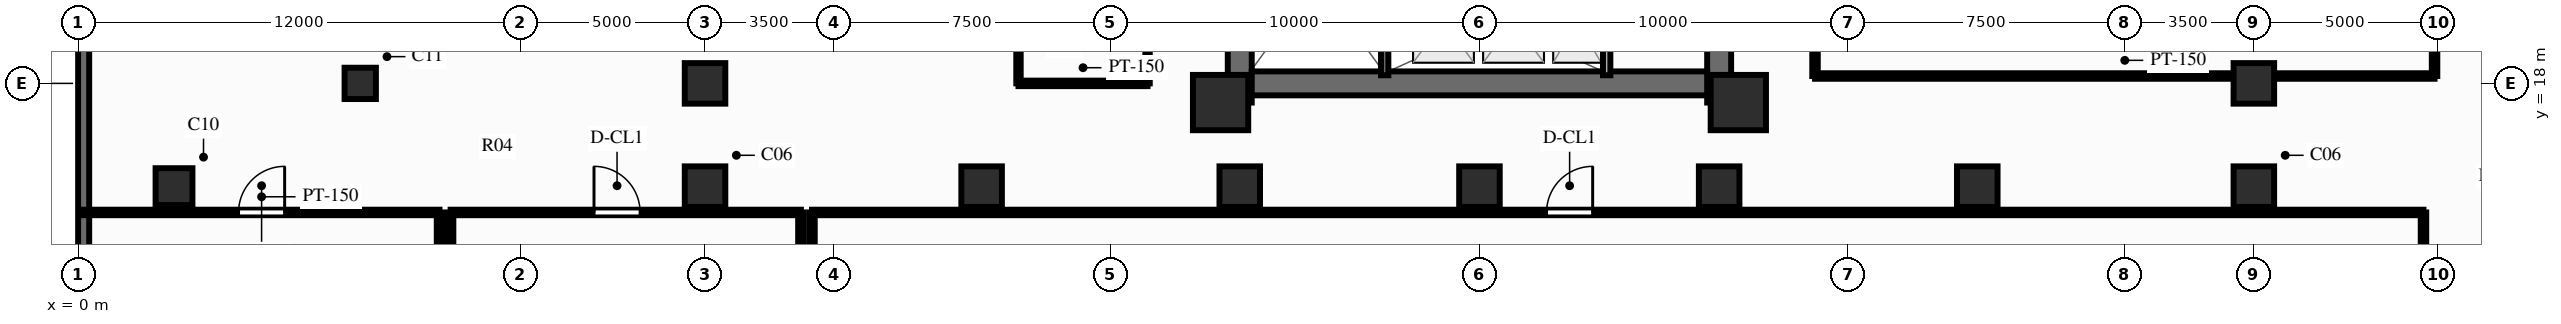
"""IFC4 building model, lengths in metres.
Left out: names, types, materials, properties, quantities, classifications, styles, units other than length and angle.
Written with IfcOpenShell. Run it as: python <this file> out.ifc"""

import sys

from ifc_helpers import new_model, si_unit, direction, frame, frame_2d, origin, origin_2d, place, context, subcontext, project, spatial, rectangle, circle, extrude, source, transform, mapped, element, fill, save


model = new_model("IFC4")
c1 = context("Model", 3, precision=1e-05, world=origin(), true_north=direction((0.0, 1.0)))
c2 = subcontext(c1, "Body", "Model", "MODEL_VIEW")
j1 = project(units=[si_unit("LENGTHUNIT", "METRE"), si_unit("PLANEANGLEUNIT", "RADIAN")], contexts=[c1])
p1 = place(None, origin())
s1 = spatial("IfcSite", under=j1, at=p1, CompositionType="ELEMENT")
p2 = place(p1, origin())
s2 = spatial("IfcBuilding", under=s1, at=p2, CompositionType="ELEMENT")
p3 = place(p2, frame((0.0, 0.0, 11.4)))
s3 = spatial("IfcBuildingStorey", under=s2, at=p3, CompositionType="ELEMENT", Elevation=11.4)
p4 = place(p3, frame((31.5, 17.48, 0.0), z_axis=(0.0, 0.0, 1.0), x_axis=(0.0, 1.0, 0.0)))
e1 = element("IfcWall", 1, at=p4, inside=s3, PredefinedType="SHEAR", context=c2, shape_type="SweptSolid", body=[
    extrude(rectangle(XDim=19.04, YDim=0.65, at=frame_2d((9.52, 0.0))), origin(), (0.0, 0.0, 1.0), 3.6),
])
p5 = place(p4, frame((6.32, 0.0, 0.0)))
e2 = element("IfcOpeningElement", 2, at=p5, cuts=e1, PredefinedType="OPENING", context=c2, shape_type="SweptSolid", body=[
    extrude(rectangle(XDim=1.1, YDim=2.15, at=frame_2d((0.55, 1.075))), frame((0.0, 0.337, 0.0), z_axis=(0.0, -1.0, 0.0), x_axis=(1.0, 0.0, 0.0)), (0.0, 0.0, 1.0), 0.674),
])
p6 = place(p3, frame((44.5, 17.48, 0.0), z_axis=(0.0, 0.0, 1.0), x_axis=(0.0, 1.0, 0.0)))
e3 = element("IfcWall", 3, at=p6, inside=s3, PredefinedType="SHEAR", context=c2, shape_type="SweptSolid", body=[
    extrude(rectangle(XDim=19.04, YDim=0.65, at=frame_2d((9.52, 0.0))), origin(), (0.0, 0.0, 1.0), 3.6),
])
p7 = place(p6, frame((12.67, 0.0, 0.0), z_axis=(0.0, 0.0, 1.0), x_axis=(-1.0, 0.0, 0.0)))
e4 = element("IfcOpeningElement", 4, at=p7, cuts=e3, PredefinedType="OPENING", context=c2, shape_type="SweptSolid", body=[
    extrude(rectangle(XDim=1.1, YDim=2.15, at=frame_2d((0.55, 1.075))), frame((0.0, 0.337, 0.0), z_axis=(0.0, -1.0, 0.0), x_axis=(1.0, 0.0, 0.0)), (0.0, 0.0, 1.0), 0.674),
])
p8 = place(p3, frame((31.825, 18.0, 0.0), z_axis=(0.0, 0.0, 1.0), x_axis=(1.0, 0.0, 0.0)))
e5 = element("IfcWall", 5, at=p8, inside=s3, PredefinedType="SHEAR", context=c2, shape_type="SweptSolid", body=[
    extrude(rectangle(XDim=12.35, YDim=0.65, at=frame_2d((6.175, 0.0))), origin(), (0.0, 0.0, 1.0), 3.6),
])
m1 = source(origin(), c2, "Body", "SweptSolid", [
    extrude(rectangle(XDim=1.5, YDim=1.5, at=origin_2d()), origin(), (0.0, 0.0, 1.0), 3.6),
])
for number, where, z_axis, x_axis in (
    (6, (30.98, 17.48, 0.0), (0.0, 0.0, 1.0), (1.0, 0.0, 0.0)),
    (7, (45.02, 17.48, 0.0), (0.0, 0.0, 1.0), (1.0, 0.0, 0.0)),
):
    element("IfcColumn", number, at=place(p3, frame(where, z_axis=z_axis, x_axis=x_axis)), inside=s3, PredefinedType="COLUMN", context=c2, shape_type="MappedRepresentation", body=[
        mapped(m1, transform((0.0, 0.0, 0.0), scale=1.0)),
    ])
m2 = source(origin(), c2, "Body", "SweptSolid", [
    extrude(circle(Radius=0.5, at=origin_2d()), origin(), (0.0, 0.0, 1.0), 3.6),
])
p9 = place(p3, frame((2.6, 15.2, 0.0), z_axis=(0.0, 0.0, 1.0), x_axis=(1.0, 0.0, 0.0)))
e8 = element("IfcColumn", 8, at=p9, inside=s3, PredefinedType="COLUMN", context=c2, shape_type="MappedRepresentation", body=[
    mapped(m2, transform((0.0, 0.0, 0.0), scale=1.0)),
])
m3 = source(origin(), c2, "Body", "SweptSolid", [
    extrude(circle(Radius=0.425, at=origin_2d()), origin(), (0.0, 0.0, 1.0), 3.6),
])
p10 = place(p3, frame((7.65, 18.0, 0.0), z_axis=(0.0, 0.0, 1.0), x_axis=(1.0, 0.0, 0.0)))
e9 = element("IfcColumn", 9, at=p10, inside=s3, PredefinedType="COLUMN", context=c2, shape_type="MappedRepresentation", body=[
    mapped(m3, transform((0.0, 0.0, 0.0), scale=1.0)),
])
m4 = source(origin(), c2, "Body", "SweptSolid", [
    extrude(rectangle(XDim=1.1, YDim=1.1, at=origin_2d()), origin(), (0.0, 0.0, 1.0), 3.6),
])
for number, where, z_axis, x_axis in (
    (10, (17.0, 15.2, 0.0), (0.0, 0.0, 1.0), (1.0, 0.0, 0.0)),
    (11, (59.0, 15.2, 0.0), (0.0, 0.0, 1.0), (1.0, 0.0, 0.0)),
    (12, (17.0, 18.0, 0.0), (0.0, 0.0, 1.0), (1.0, 0.0, 0.0)),
    (13, (59.0, 18.0, 0.0), (0.0, 0.0, 1.0), (1.0, 0.0, 0.0)),
    (14, (24.5, 15.2, 0.0), (0.0, 0.0, 1.0), (1.0, 0.0, 0.0)),
    (15, (31.5, 15.2, 0.0), (0.0, 0.0, 1.0), (1.0, 0.0, 0.0)),
    (16, (38.0, 15.2, 0.0), (0.0, 0.0, 1.0), (1.0, 0.0, 0.0)),
    (17, (44.5, 15.2, 0.0), (0.0, 0.0, 1.0), (1.0, 0.0, 0.0)),
    (18, (51.5, 15.2, 0.0), (0.0, 0.0, 1.0), (1.0, 0.0, 0.0)),
):
    element("IfcColumn", number, at=place(p3, frame(where, z_axis=z_axis, x_axis=x_axis)), inside=s3, PredefinedType="COLUMN", context=c2, shape_type="MappedRepresentation", body=[
        mapped(m4, transform((0.0, 0.0, 0.0), scale=1.0)),
    ])
p11 = place(p3, frame((0.15, 0.0, 0.0), z_axis=(0.0, 0.0, 1.0), x_axis=(0.0, 1.0, 0.0)))
e19 = element("IfcWall", 19, at=p11, inside=s3, PredefinedType="SOLIDWALL", context=c2, shape_type="SweptSolid", body=[
    extrude(rectangle(XDim=54.0, YDim=0.3, at=frame_2d((27.0, 0.0))), origin(), (0.0, 0.0, 1.0), 2.88),
])
p12 = place(p11, frame((6.405, 0.0, 0.85)))
e20 = element("IfcOpeningElement", 20, at=p12, cuts=e19, PredefinedType="OPENING", context=c2, shape_type="SweptSolid", body=[
    extrude(rectangle(XDim=1.8, YDim=1.65, at=frame_2d((0.9, 0.825))), frame((0.0, 0.162, 0.0), z_axis=(0.0, -1.0, 0.0), x_axis=(1.0, 0.0, 0.0)), (0.0, 0.0, 1.0), 0.324),
])
p13 = place(p11, frame((26.045, 0.0, 0.85)))
e21 = element("IfcOpeningElement", 21, at=p13, cuts=e19, PredefinedType="OPENING", context=c2, shape_type="SweptSolid", body=[
    extrude(rectangle(XDim=1.8, YDim=1.65, at=frame_2d((0.9, 0.825))), frame((0.0, 0.162, 0.0), z_axis=(0.0, -1.0, 0.0), x_axis=(1.0, 0.0, 0.0)), (0.0, 0.0, 1.0), 0.324),
])
p14 = place(p3, frame((41.45, 18.22, 0.0), z_axis=(0.0, 0.0, 1.0), x_axis=(0.0, 1.0, 0.0)))
e22 = element("IfcWall", 22, at=p14, inside=s3, PredefinedType="PARTITIONING", context=c2, shape_type="SweptSolid", body=[
    extrude(rectangle(XDim=2.96, YDim=0.2, at=frame_2d((1.48, 0.0))), origin(), (0.0, 0.0, 1.0), 3.25),
])
p15 = place(p3, frame((35.43, 18.22, 0.0), z_axis=(0.0, 0.0, 1.0), x_axis=(0.0, 1.0, 0.0)))
e23 = element("IfcWall", 23, at=p15, inside=s3, PredefinedType="SOLIDWALL", context=c2, shape_type="SweptSolid", body=[
    extrude(rectangle(XDim=7.22, YDim=0.2, at=frame_2d((3.61, 0.0))), origin(), (0.0, 0.0, 1.0), 3.25),
])
p16 = place(p15, frame((6.68, 0.0, 0.0), z_axis=(0.0, 0.0, 1.0), x_axis=(-1.0, 0.0, 0.0)))
e24 = element("IfcOpeningElement", 24, at=p16, cuts=e23, PredefinedType="OPENING", context=c2, shape_type="SweptSolid", body=[
    extrude(rectangle(XDim=1.1, YDim=2.15, at=frame_2d((0.55, 1.075))), frame((0.0, 0.112, 0.0), z_axis=(0.0, -1.0, 0.0), x_axis=(1.0, 0.0, 0.0)), (0.0, 0.0, 1.0), 0.224),
])
p17 = place(p3, frame((25.5, 18.0, 0.0), z_axis=(0.0, 0.0, 1.0), x_axis=(0.0, 1.0, 0.0)))
e25 = element("IfcWall", 25, at=p17, inside=s3, PredefinedType="PARTITIONING", context=c2, shape_type="SweptSolid", body=[
    extrude(rectangle(XDim=18.0, YDim=0.12, at=frame_2d((9.0, 0.0))), origin(), (0.0, 0.0, 1.0), 3.25),
])
p18 = place(p3, frame((29.0, 18.0, 0.0), z_axis=(0.0, 0.0, 1.0), x_axis=(0.0, 1.0, 0.0)))
e26 = element("IfcWall", 26, at=p18, inside=s3, PredefinedType="PARTITIONING", context=c2, shape_type="SweptSolid", body=[
    extrude(rectangle(XDim=4.0, YDim=0.12, at=frame_2d((2.0, 0.0))), origin(), (0.0, 0.0, 1.0), 3.25),
])
p19 = place(p18, frame((1.55, 0.0, 0.0)))
e27 = element("IfcOpeningElement", 27, at=p19, cuts=e26, PredefinedType="OPENING", context=c2, shape_type="SweptSolid", body=[
    extrude(rectangle(XDim=0.9, YDim=2.1, at=frame_2d((0.45, 1.05))), frame((0.0, 0.072, 0.0), z_axis=(0.0, -1.0, 0.0), x_axis=(1.0, 0.0, 0.0)), (0.0, 0.0, 1.0), 0.144),
])
p20 = place(p3, frame((25.5, 18.0, 0.0), z_axis=(0.0, 0.0, 1.0), x_axis=(1.0, 0.0, 0.0)))
e28 = element("IfcWall", 28, at=p20, inside=s3, PredefinedType="PARTITIONING", context=c2, shape_type="SweptSolid", body=[
    extrude(rectangle(XDim=3.5, YDim=0.15, at=frame_2d((1.75, 0.0))), origin(), (0.0, 0.0, 1.0), 2.69),
])
p21 = place(p3, frame((0.15, 14.5, 0.0), z_axis=(0.0, 0.0, 1.0), x_axis=(1.0, 0.0, 0.0)))
e29 = element("IfcWall", 29, at=p21, inside=s3, PredefinedType="PARTITIONING", context=c2, shape_type="SweptSolid", body=[
    extrude(rectangle(XDim=9.65, YDim=0.15, at=frame_2d((4.825, 0.0))), origin(), (0.0, 0.0, 1.0), 3.25),
])
p22 = place(p21, frame((4.2, 0.0, 0.0)))
e30 = element("IfcOpeningElement", 30, at=p22, cuts=e29, PredefinedType="OPENING", context=c2, shape_type="SweptSolid", body=[
    extrude(rectangle(XDim=1.25, YDim=2.15, at=frame_2d((0.625, 1.075))), frame((0.0, 0.087, 0.0), z_axis=(0.0, -1.0, 0.0), x_axis=(1.0, 0.0, 0.0)), (0.0, 0.0, 1.0), 0.174),
])
p23 = place(p3, frame((9.8, 0.1, 0.0), z_axis=(0.0, 0.0, 1.0), x_axis=(0.0, 1.0, 0.0)))
e31 = element("IfcWall", 31, at=p23, inside=s3, PredefinedType="PARTITIONING", context=c2, shape_type="SweptSolid", body=[
    extrude(rectangle(XDim=14.4, YDim=0.15, at=frame_2d((7.2, 0.0))), origin(), (0.0, 0.0, 1.0), 3.25),
])
p24 = place(p3, frame((10.1, 14.5, 0.0), z_axis=(0.0, 0.0, 1.0), x_axis=(1.0, 0.0, 0.0)))
e32 = element("IfcWall", 32, at=p24, inside=s3, PredefinedType="PARTITIONING", context=c2, shape_type="SweptSolid", body=[
    extrude(rectangle(XDim=9.5, YDim=0.15, at=frame_2d((4.75, 0.0))), origin(), (0.0, 0.0, 1.0), 3.25),
])
p25 = place(p24, frame((3.889, 0.0, 0.0)))
e33 = element("IfcOpeningElement", 33, at=p25, cuts=e32, PredefinedType="OPENING", context=c2, shape_type="SweptSolid", body=[
    extrude(rectangle(XDim=1.25, YDim=2.15, at=frame_2d((0.625, 1.075))), frame((0.0, 0.087, 0.0), z_axis=(0.0, -1.0, 0.0), x_axis=(1.0, 0.0, 0.0)), (0.0, 0.0, 1.0), 0.174),
])
for number, where, z_axis, x_axis in (
    (34, (10.1, 0.1, 0.0), (0.0, 0.0, 1.0), (0.0, 1.0, 0.0)),
    (35, (19.6, 0.1, 0.0), (0.0, 0.0, 1.0), (0.0, 1.0, 0.0)),
):
    element("IfcWall", number, at=place(p3, frame(where, z_axis=z_axis, x_axis=x_axis)), inside=s3, PredefinedType="PARTITIONING", context=c2, shape_type="SweptSolid", body=[
        extrude(rectangle(XDim=14.4, YDim=0.15, at=frame_2d((7.2, 0.0))), origin(), (0.0, 0.0, 1.0), 3.25),
    ])
p26 = place(p3, frame((19.9, 14.5, 0.0), z_axis=(0.0, 0.0, 1.0), x_axis=(1.0, 0.0, 0.0)))
e36 = element("IfcWall", 36, at=p26, inside=s3, PredefinedType="PARTITIONING", context=c2, shape_type="SweptSolid", body=[
    extrude(rectangle(XDim=43.7, YDim=0.15, at=frame_2d((21.85, 0.0))), origin(), (0.0, 0.0, 1.0), 3.25),
])
p27 = place(p26, frame((19.92, 0.0, 0.0)))
e37 = element("IfcOpeningElement", 37, at=p27, cuts=e36, PredefinedType="OPENING", context=c2, shape_type="SweptSolid", body=[
    extrude(rectangle(XDim=1.25, YDim=2.15, at=frame_2d((0.625, 1.075))), frame((0.0, 0.087, 0.0), z_axis=(0.0, -1.0, 0.0), x_axis=(1.0, 0.0, 0.0)), (0.0, 0.0, 1.0), 0.174),
])
for number, where, z_axis, x_axis in (
    (38, (19.9, 0.1, 0.0), (0.0, 0.0, 1.0), (0.0, 1.0, 0.0)),
    (39, (63.6, 0.1, 0.0), (0.0, 0.0, 1.0), (0.0, 1.0, 0.0)),
):
    element("IfcWall", number, at=place(p3, frame(where, z_axis=z_axis, x_axis=x_axis)), inside=s3, PredefinedType="PARTITIONING", context=c2, shape_type="SweptSolid", body=[
        extrude(rectangle(XDim=14.4, YDim=0.15, at=frame_2d((7.2, 0.0))), origin(), (0.0, 0.0, 1.0), 3.25),
    ])
p28 = place(p3, frame((47.1, 18.2, 0.0), z_axis=(0.0, 0.0, 1.0), x_axis=(1.0, 0.0, 0.0)))
e40 = element("IfcWall", 40, at=p28, inside=s3, PredefinedType="PARTITIONING", context=c2, shape_type="SweptSolid", body=[
    extrude(rectangle(XDim=16.8, YDim=0.15, at=frame_2d((8.4, 0.0))), origin(), (0.0, 0.0, 1.0), 3.25),
])
p29 = place(p3, frame((47.1, 18.2, 0.0), z_axis=(0.0, 0.0, 1.0), x_axis=(0.0, 1.0, 0.0)))
e41 = element("IfcWall", 41, at=p29, inside=s3, PredefinedType="PARTITIONING", context=c2, shape_type="SweptSolid", body=[
    extrude(rectangle(XDim=17.6, YDim=0.15, at=frame_2d((8.8, 0.0))), origin(), (0.0, 0.0, 1.0), 3.25),
])
p30 = place(p3, frame((63.9, 18.2, 0.0), z_axis=(0.0, 0.0, 1.0), x_axis=(0.0, 1.0, 0.0)))
e42 = element("IfcWall", 42, at=p30, inside=s3, PredefinedType="PARTITIONING", context=c2, shape_type="SweptSolid", body=[
    extrude(rectangle(XDim=17.6, YDim=0.15, at=frame_2d((8.8, 0.0))), origin(), (0.0, 0.0, 1.0), 3.25),
])
p31 = place(p30, frame((7.686, 0.0, 0.0)))
e43 = element("IfcOpeningElement", 43, at=p31, cuts=e42, PredefinedType="OPENING", context=c2, shape_type="SweptSolid", body=[
    extrude(rectangle(XDim=1.25, YDim=2.15, at=frame_2d((0.625, 1.075))), frame((0.0, 0.087, 0.0), z_axis=(0.0, -1.0, 0.0), x_axis=(1.0, 0.0, 0.0)), (0.0, 0.0, 1.0), 0.174),
])
m5 = source(origin(), c2, "Body", "SweptSolid", [
    extrude(rectangle(XDim=1.25, YDim=2.15, at=frame_2d((0.625, 1.075))), frame((0.0, 0.025, 0.0), z_axis=(0.0, -1.0, 0.0), x_axis=(1.0, 0.0, 0.0)), (0.0, 0.0, 1.0), 0.05),
])
p32 = place(p22, origin())
e44 = element("IfcDoor", 44, at=p32, inside=s3, OperationType="SINGLE_SWING_RIGHT", PredefinedType="DOOR", context=c2, shape_type="MappedRepresentation", body=[
    mapped(m5, transform((0.0, 0.0, 0.0), scale=1.0)),
])
fill(e30, e44)
p33 = place(p25, origin())
e45 = element("IfcDoor", 45, at=p33, inside=s3, OperationType="SINGLE_SWING_LEFT", PredefinedType="DOOR", context=c2, shape_type="MappedRepresentation", body=[
    mapped(m5, transform((0.0, 0.0, 0.0), scale=1.0)),
])
fill(e33, e45)
p34 = place(p27, origin())
e46 = element("IfcDoor", 46, at=p34, inside=s3, OperationType="SINGLE_SWING_RIGHT", PredefinedType="DOOR", context=c2, shape_type="MappedRepresentation", body=[
    mapped(m5, transform((0.0, 0.0, 0.0), scale=1.0)),
])
fill(e37, e46)
save(model, sys.argv[1])
